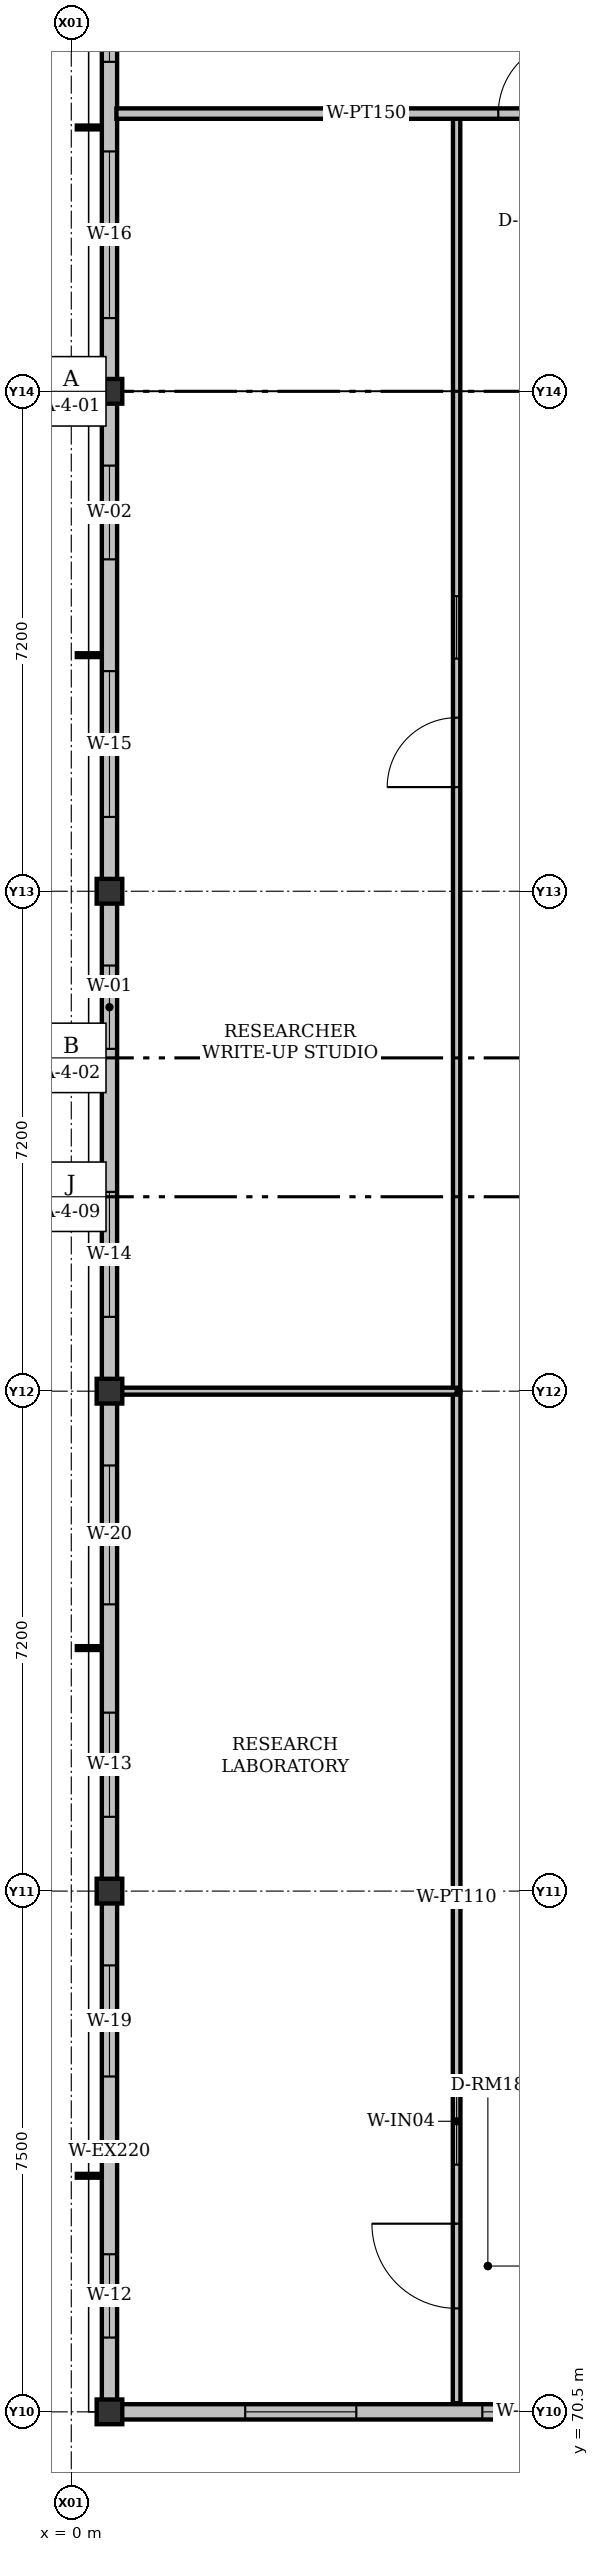
"""IFC4 building model, lengths in metres.
Left out: names, types, materials, properties, quantities, classifications, styles, units other than length and angle.
Written with IfcOpenShell. Run it as: python <this file> out.ifc"""

import sys

from ifc_helpers import new_model, si_unit, direction, frame, frame_2d, origin, origin_2d, place, context, subcontext, project, spatial, rectangle, i_section, extrude, element, fill, save


model = new_model("IFC4")
c1 = context("Model", 3, precision=1e-05, world=origin(), true_north=direction((0.0, 1.0)))
c2 = subcontext(c1, "Body", "Model", "MODEL_VIEW")
j1 = project(units=[si_unit("LENGTHUNIT", "METRE"), si_unit("PLANEANGLEUNIT", "RADIAN")], contexts=[c1])
p1 = place(None, origin())
s1 = spatial("IfcSite", under=j1, at=p1, CompositionType="ELEMENT")
p2 = place(p1, origin())
s2 = spatial("IfcBuilding", under=s1, at=p2, CompositionType="ELEMENT")
p3 = place(p2, frame((0.0, 0.0, 47.7)))
s3 = spatial("IfcBuildingStorey", under=s2, at=p3, CompositionType="ELEMENT", Elevation=47.7)
for number, where, z_axis, x_axis in (
    (1, (0.55, 70.5, 0.0), (0.0, 0.0, 1.0), (1.0, 0.0, 0.0)),
    (2, (0.55, 78.0, 0.0), (0.0, 0.0, 1.0), (1.0, 0.0, 0.0)),
    (3, (0.55, 85.2, 0.0), (0.0, 0.0, 1.0), (1.0, 0.0, 0.0)),
    (4, (0.55, 92.4, 0.0), (0.0, 0.0, 1.0), (1.0, 0.0, 0.0)),
    (5, (0.55, 99.6, 0.0), (0.0, 0.0, 1.0), (1.0, 0.0, 0.0)),
):
    element("IfcColumn", number, at=place(p3, frame(where, z_axis=z_axis, x_axis=x_axis)), inside=s3, PredefinedType="COLUMN", context=c2, shape_type="SweptSolid", body=[
        extrude(i_section(OverallWidth=0.369, OverallDepth=0.356, WebThickness=0.011, FlangeThickness=0.018, FilletRadius=0.015, at=origin_2d()), origin(), (0.0, 0.0, 1.0), 4.2),
    ])
p4 = place(p3, frame((0.55, 70.5, 0.0), z_axis=(0.0, 0.0, 1.0), x_axis=(0.0, 1.0, 0.0)))
e6 = element("IfcWall", 6, at=p4, inside=s3, PredefinedType="SOLIDWALL", context=c2, shape_type="SweptSolid", body=[
    extrude(rectangle(XDim=7.5, YDim=0.22, at=frame_2d((3.75, 0.0))), origin(), (0.0, 0.0, 1.0), 3.577),
])
p5 = place(p4, frame((1.07, 0.0, 0.92)))
e7 = element("IfcOpeningElement", 7, at=p5, cuts=e6, PredefinedType="OPENING", context=c2, shape_type="SweptSolid", body=[
    extrude(rectangle(XDim=1.2, YDim=1.7, at=frame_2d((0.6, 0.85))), frame((0.0, 0.11, 0.0), z_axis=(0.0, -1.0, 0.0), x_axis=(1.0, 0.0, 0.0)), (0.0, 0.0, 1.0), 0.22),
])
p6 = place(p4, frame((4.83, 0.0, 0.92)))
e8 = element("IfcOpeningElement", 8, at=p6, cuts=e6, PredefinedType="OPENING", context=c2, shape_type="SweptSolid", body=[
    extrude(rectangle(XDim=1.6, YDim=1.35, at=frame_2d((0.8, 0.675))), frame((0.0, 0.11, 0.0), z_axis=(0.0, -1.0, 0.0), x_axis=(1.0, 0.0, 0.0)), (0.0, 0.0, 1.0), 0.22),
])
p7 = place(p3, frame((0.55, 78.0, 0.0), z_axis=(0.0, 0.0, 1.0), x_axis=(0.0, 1.0, 0.0)))
e9 = element("IfcWall", 9, at=p7, inside=s3, PredefinedType="SOLIDWALL", context=c2, shape_type="SweptSolid", body=[
    extrude(rectangle(XDim=7.2, YDim=0.22, at=frame_2d((3.6, 0.0))), origin(), (0.0, 0.0, 1.0), 3.577),
])
p8 = place(p7, frame((1.07, 0.0, 0.92)))
e10 = element("IfcOpeningElement", 10, at=p8, cuts=e9, PredefinedType="OPENING", context=c2, shape_type="SweptSolid", body=[
    extrude(rectangle(XDim=1.5, YDim=1.7, at=frame_2d((0.75, 0.85))), frame((0.0, 0.11, 0.0), z_axis=(0.0, -1.0, 0.0), x_axis=(1.0, 0.0, 0.0)), (0.0, 0.0, 1.0), 0.22),
])
p9 = place(p7, frame((4.13, 0.0, 0.92)))
e11 = element("IfcOpeningElement", 11, at=p9, cuts=e9, PredefinedType="OPENING", context=c2, shape_type="SweptSolid", body=[
    extrude(rectangle(XDim=2.0, YDim=1.35, at=frame_2d((1.0, 0.675))), frame((0.0, 0.11, 0.0), z_axis=(0.0, -1.0, 0.0), x_axis=(1.0, 0.0, 0.0)), (0.0, 0.0, 1.0), 0.22),
])
p10 = place(p3, frame((0.55, 85.2, 0.0), z_axis=(0.0, 0.0, 1.0), x_axis=(0.0, 1.0, 0.0)))
e12 = element("IfcWall", 12, at=p10, inside=s3, PredefinedType="SOLIDWALL", context=c2, shape_type="SweptSolid", body=[
    extrude(rectangle(XDim=7.2, YDim=0.22, at=frame_2d((3.6, 0.0))), origin(), (0.0, 0.0, 1.0), 3.577),
])
p11 = place(p10, frame((1.07, 0.0, 0.92)))
e13 = element("IfcOpeningElement", 13, at=p11, cuts=e12, PredefinedType="OPENING", context=c2, shape_type="SweptSolid", body=[
    extrude(rectangle(XDim=1.8, YDim=1.7, at=frame_2d((0.9, 0.85))), frame((0.0, 0.11, 0.0), z_axis=(0.0, -1.0, 0.0), x_axis=(1.0, 0.0, 0.0)), (0.0, 0.0, 1.0), 0.22),
])
p12 = place(p10, frame((4.93, 0.0, 0.92)))
e14 = element("IfcOpeningElement", 14, at=p12, cuts=e12, PredefinedType="OPENING", context=c2, shape_type="SweptSolid", body=[
    extrude(rectangle(XDim=1.2, YDim=1.4, at=frame_2d((0.6, 0.7))), frame((0.0, 0.11, 0.0), z_axis=(0.0, -1.0, 0.0), x_axis=(1.0, 0.0, 0.0)), (0.0, 0.0, 1.0), 0.22),
])
p13 = place(p3, frame((0.55, 92.4, 0.0), z_axis=(0.0, 0.0, 1.0), x_axis=(0.0, 1.0, 0.0)))
e15 = element("IfcWall", 15, at=p13, inside=s3, PredefinedType="SOLIDWALL", context=c2, shape_type="SweptSolid", body=[
    extrude(rectangle(XDim=7.2, YDim=0.22, at=frame_2d((3.6, 0.0))), origin(), (0.0, 0.0, 1.0), 3.577),
])
p14 = place(p13, frame((1.07, 0.0, 0.92)))
e16 = element("IfcOpeningElement", 16, at=p14, cuts=e15, PredefinedType="OPENING", context=c2, shape_type="SweptSolid", body=[
    extrude(rectangle(XDim=2.1, YDim=1.7, at=frame_2d((1.05, 0.85))), frame((0.0, 0.11, 0.0), z_axis=(0.0, -1.0, 0.0), x_axis=(1.0, 0.0, 0.0)), (0.0, 0.0, 1.0), 0.22),
])
p15 = place(p13, frame((4.78, 0.0, 0.92)))
e17 = element("IfcOpeningElement", 17, at=p15, cuts=e15, PredefinedType="OPENING", context=c2, shape_type="SweptSolid", body=[
    extrude(rectangle(XDim=1.35, YDim=1.4, at=frame_2d((0.675, 0.7))), frame((0.0, 0.11, 0.0), z_axis=(0.0, -1.0, 0.0), x_axis=(1.0, 0.0, 0.0)), (0.0, 0.0, 1.0), 0.22),
])
p16 = place(p3, frame((0.55, 99.6, 0.0), z_axis=(0.0, 0.0, 1.0), x_axis=(0.0, 1.0, 0.0)))
e18 = element("IfcWall", 18, at=p16, inside=s3, PredefinedType="SOLIDWALL", context=c2, shape_type="SweptSolid", body=[
    extrude(rectangle(XDim=7.2, YDim=0.22, at=frame_2d((3.6, 0.0))), origin(), (0.0, 0.0, 1.0), 3.577),
])
p17 = place(p16, frame((1.055, 0.0, 0.92)))
e19 = element("IfcOpeningElement", 19, at=p17, cuts=e18, PredefinedType="OPENING", context=c2, shape_type="SweptSolid", body=[
    extrude(rectangle(XDim=2.4, YDim=1.7, at=frame_2d((1.2, 0.85))), frame((0.0, 0.11, 0.0), z_axis=(0.0, -1.0, 0.0), x_axis=(1.0, 0.0, 0.0)), (0.0, 0.0, 1.0), 0.22),
])
p18 = place(p16, frame((4.745, 0.0, 0.92)))
e20 = element("IfcOpeningElement", 20, at=p18, cuts=e18, PredefinedType="OPENING", context=c2, shape_type="SweptSolid", body=[
    extrude(rectangle(XDim=1.2, YDim=1.55, at=frame_2d((0.6, 0.775))), frame((0.0, 0.11, 0.0), z_axis=(0.0, -1.0, 0.0), x_axis=(1.0, 0.0, 0.0)), (0.0, 0.0, 1.0), 0.22),
])
p19 = place(p3, frame((7.85, 70.5, 0.0), z_axis=(0.0, 0.0, 1.0), x_axis=(-1.0, 0.0, 0.0)))
e21 = element("IfcWall", 21, at=p19, inside=s3, PredefinedType="SOLIDWALL", context=c2, shape_type="SweptSolid", body=[
    extrude(rectangle(XDim=7.3, YDim=0.22, at=frame_2d((3.65, 0.0))), origin(), (0.0, 0.0, 1.0), 3.577),
])
p20 = place(p19, frame((0.88, 0.0, 0.92)))
e22 = element("IfcOpeningElement", 22, at=p20, cuts=e21, PredefinedType="OPENING", context=c2, shape_type="SweptSolid", body=[
    extrude(rectangle(XDim=1.05, YDim=1.3, at=frame_2d((0.525, 0.65))), frame((0.0, 0.11, 0.0), z_axis=(0.0, -1.0, 0.0), x_axis=(1.0, 0.0, 0.0)), (0.0, 0.0, 1.0), 0.22),
])
p21 = place(p19, frame((3.745, 0.0, 0.92)))
e23 = element("IfcOpeningElement", 23, at=p21, cuts=e21, PredefinedType="OPENING", context=c2, shape_type="SweptSolid", body=[
    extrude(rectangle(XDim=1.6, YDim=1.35, at=frame_2d((0.8, 0.675))), frame((0.0, 0.11, 0.0), z_axis=(0.0, -1.0, 0.0), x_axis=(1.0, 0.0, 0.0)), (0.0, 0.0, 1.0), 0.22),
])
p22 = place(p3, frame((5.55, 70.625, 0.0), z_axis=(0.0, 0.0, 1.0), x_axis=(0.0, 1.0, 0.0)))
e24 = element("IfcWall", 24, at=p22, inside=s3, PredefinedType="PARTITIONING", context=c2, shape_type="SweptSolid", body=[
    extrude(rectangle(XDim=14.575, YDim=0.11, at=frame_2d((7.288, 0.0))), origin(), (0.0, 0.0, 1.0), 3.451),
])
p23 = place(p22, frame((1.365, 0.0, 0.0)))
e25 = element("IfcOpeningElement", 25, at=p23, cuts=e24, PredefinedType="OPENING", context=c2, shape_type="SweptSolid", body=[
    extrude(rectangle(XDim=1.22, YDim=2.2, at=frame_2d((0.61, 1.1))), frame((0.0, 0.055, 0.0), z_axis=(0.0, -1.0, 0.0), x_axis=(1.0, 0.0, 0.0)), (0.0, 0.0, 1.0), 0.11),
])
p24 = place(p22, frame((3.435, 0.0, 0.92)))
e26 = element("IfcOpeningElement", 26, at=p24, cuts=e24, PredefinedType="OPENING", context=c2, shape_type="SweptSolid", body=[
    extrude(rectangle(XDim=1.25, YDim=1.1, at=frame_2d((0.625, 0.55))), frame((0.0, 0.055, 0.0), z_axis=(0.0, -1.0, 0.0), x_axis=(1.0, 0.0, 0.0)), (0.0, 0.0, 1.0), 0.11),
])
p25 = place(p3, frame((5.55, 85.2, 0.0), z_axis=(0.0, 0.0, 1.0), x_axis=(0.0, 1.0, 0.0)))
e27 = element("IfcWall", 27, at=p25, inside=s3, PredefinedType="PARTITIONING", context=c2, shape_type="SweptSolid", body=[
    extrude(rectangle(XDim=18.4, YDim=0.105, at=frame_2d((9.2, 0.0))), origin(), (0.0, 0.0, 1.0), 3.451),
])
p26 = place(p25, frame((8.7, 0.0, 0.0)))
e28 = element("IfcOpeningElement", 28, at=p26, cuts=e27, PredefinedType="OPENING", context=c2, shape_type="SweptSolid", body=[
    extrude(rectangle(XDim=1.0, YDim=2.25, at=frame_2d((0.5, 1.125))), frame((0.0, 0.052, 0.0), z_axis=(0.0, -1.0, 0.0), x_axis=(1.0, 0.0, 0.0)), (0.0, 0.0, 1.0), 0.105),
])
p27 = place(p25, frame((10.55, 0.0, 0.92)))
e29 = element("IfcOpeningElement", 29, at=p27, cuts=e27, PredefinedType="OPENING", context=c2, shape_type="SweptSolid", body=[
    extrude(rectangle(XDim=0.9, YDim=1.2, at=frame_2d((0.45, 0.6))), frame((0.0, 0.052, 0.0), z_axis=(0.0, -1.0, 0.0), x_axis=(1.0, 0.0, 0.0)), (0.0, 0.0, 1.0), 0.105),
])
p28 = place(p3, frame((0.65, 85.2, 0.0), z_axis=(0.0, 0.0, 1.0), x_axis=(1.0, 0.0, 0.0)))
e30 = element("IfcWall", 30, at=p28, inside=s3, PredefinedType="PARTITIONING", context=c2, shape_type="SweptSolid", body=[
    extrude(rectangle(XDim=4.9, YDim=0.1, at=frame_2d((2.45, 0.0))), origin(), (0.0, 0.0, 1.0), 3.451),
])
p29 = place(p3, frame((0.65, 103.6, 0.0), z_axis=(0.0, 0.0, 1.0), x_axis=(1.0, 0.0, 0.0)))
e31 = element("IfcWall", 31, at=p29, inside=s3, PredefinedType="PARTITIONING", context=c2, shape_type="SweptSolid", body=[
    extrude(rectangle(XDim=7.2, YDim=0.15, at=frame_2d((3.6, 0.0))), origin(), (0.0, 0.0, 1.0), 3.527),
])
p30 = place(p29, frame((5.5, 0.0, 0.0)))
e32 = element("IfcOpeningElement", 32, at=p30, cuts=e31, PredefinedType="OPENING", context=c2, shape_type="SweptSolid", body=[
    extrude(rectangle(XDim=1.06, YDim=2.25, at=frame_2d((0.53, 1.125))), frame((0.0, 0.075, 0.0), z_axis=(0.0, -1.0, 0.0), x_axis=(1.0, 0.0, 0.0)), (0.0, 0.0, 1.0), 0.15),
])
p31 = place(p5, origin())
e33 = element("IfcWindow", 33, at=p31, inside=s3, PartitioningType="SINGLE_PANEL", PredefinedType="WINDOW", context=c2, shape_type="SweptSolid", body=[
    extrude(rectangle(XDim=1.2, YDim=1.7, at=frame_2d((0.6, 0.85))), frame((0.0, 0.03, 0.0), z_axis=(0.0, -1.0, 0.0), x_axis=(1.0, 0.0, 0.0)), (0.0, 0.0, 1.0), 0.06),
])
fill(e7, e33)
p32 = place(p6, origin())
e34 = element("IfcWindow", 34, at=p32, inside=s3, PartitioningType="DOUBLE_PANEL_VERTICAL", PredefinedType="WINDOW", context=c2, shape_type="SweptSolid", body=[
    extrude(rectangle(XDim=1.6, YDim=1.35, at=frame_2d((0.8, 0.675))), frame((0.0, 0.03, 0.0), z_axis=(0.0, -1.0, 0.0), x_axis=(1.0, 0.0, 0.0)), (0.0, 0.0, 1.0), 0.06),
])
fill(e8, e34)
p33 = place(p8, origin())
e35 = element("IfcWindow", 35, at=p33, inside=s3, PartitioningType="SINGLE_PANEL", PredefinedType="WINDOW", context=c2, shape_type="SweptSolid", body=[
    extrude(rectangle(XDim=1.5, YDim=1.7, at=frame_2d((0.75, 0.85))), frame((0.0, 0.03, 0.0), z_axis=(0.0, -1.0, 0.0), x_axis=(1.0, 0.0, 0.0)), (0.0, 0.0, 1.0), 0.06),
])
fill(e10, e35)
p34 = place(p9, origin())
e36 = element("IfcWindow", 36, at=p34, inside=s3, PartitioningType="DOUBLE_PANEL_VERTICAL", PredefinedType="WINDOW", context=c2, shape_type="SweptSolid", body=[
    extrude(rectangle(XDim=2.0, YDim=1.35, at=frame_2d((1.0, 0.675))), frame((0.0, 0.03, 0.0), z_axis=(0.0, -1.0, 0.0), x_axis=(1.0, 0.0, 0.0)), (0.0, 0.0, 1.0), 0.06),
])
fill(e11, e36)
p35 = place(p11, origin())
e37 = element("IfcWindow", 37, at=p35, inside=s3, PartitioningType="DOUBLE_PANEL_VERTICAL", PredefinedType="WINDOW", context=c2, shape_type="SweptSolid", body=[
    extrude(rectangle(XDim=1.8, YDim=1.7, at=frame_2d((0.9, 0.85))), frame((0.0, 0.03, 0.0), z_axis=(0.0, -1.0, 0.0), x_axis=(1.0, 0.0, 0.0)), (0.0, 0.0, 1.0), 0.06),
])
fill(e13, e37)
p36 = place(p12, origin())
e38 = element("IfcWindow", 38, at=p36, inside=s3, PartitioningType="SINGLE_PANEL", PredefinedType="WINDOW", context=c2, shape_type="SweptSolid", body=[
    extrude(rectangle(XDim=1.2, YDim=1.4, at=frame_2d((0.6, 0.7))), frame((0.0, 0.03, 0.0), z_axis=(0.0, -1.0, 0.0), x_axis=(1.0, 0.0, 0.0)), (0.0, 0.0, 1.0), 0.06),
])
fill(e14, e38)
p37 = place(p14, origin())
e39 = element("IfcWindow", 39, at=p37, inside=s3, PartitioningType="DOUBLE_PANEL_VERTICAL", PredefinedType="WINDOW", context=c2, shape_type="SweptSolid", body=[
    extrude(rectangle(XDim=2.1, YDim=1.7, at=frame_2d((1.05, 0.85))), frame((0.0, 0.03, 0.0), z_axis=(0.0, -1.0, 0.0), x_axis=(1.0, 0.0, 0.0)), (0.0, 0.0, 1.0), 0.06),
])
fill(e16, e39)
p38 = place(p15, origin())
e40 = element("IfcWindow", 40, at=p38, inside=s3, PartitioningType="SINGLE_PANEL", PredefinedType="WINDOW", context=c2, shape_type="SweptSolid", body=[
    extrude(rectangle(XDim=1.35, YDim=1.4, at=frame_2d((0.675, 0.7))), frame((0.0, 0.03, 0.0), z_axis=(0.0, -1.0, 0.0), x_axis=(1.0, 0.0, 0.0)), (0.0, 0.0, 1.0), 0.06),
])
fill(e17, e40)
p39 = place(p17, origin())
e41 = element("IfcWindow", 41, at=p39, inside=s3, PartitioningType="DOUBLE_PANEL_VERTICAL", PredefinedType="WINDOW", context=c2, shape_type="SweptSolid", body=[
    extrude(rectangle(XDim=2.4, YDim=1.7, at=frame_2d((1.2, 0.85))), frame((0.0, 0.03, 0.0), z_axis=(0.0, -1.0, 0.0), x_axis=(1.0, 0.0, 0.0)), (0.0, 0.0, 1.0), 0.06),
])
fill(e19, e41)
p40 = place(p18, origin())
e42 = element("IfcWindow", 42, at=p40, inside=s3, PartitioningType="SINGLE_PANEL", PredefinedType="WINDOW", context=c2, shape_type="SweptSolid", body=[
    extrude(rectangle(XDim=1.2, YDim=1.55, at=frame_2d((0.6, 0.775))), frame((0.0, 0.03, 0.0), z_axis=(0.0, -1.0, 0.0), x_axis=(1.0, 0.0, 0.0)), (0.0, 0.0, 1.0), 0.06),
])
fill(e20, e42)
p41 = place(p20, origin())
e43 = element("IfcWindow", 43, at=p41, inside=s3, PartitioningType="SINGLE_PANEL", PredefinedType="WINDOW", context=c2, shape_type="SweptSolid", body=[
    extrude(rectangle(XDim=1.05, YDim=1.3, at=frame_2d((0.525, 0.65))), frame((0.0, 0.03, 0.0), z_axis=(0.0, -1.0, 0.0), x_axis=(1.0, 0.0, 0.0)), (0.0, 0.0, 1.0), 0.06),
])
fill(e22, e43)
p42 = place(p21, origin())
e44 = element("IfcWindow", 44, at=p42, inside=s3, PartitioningType="DOUBLE_PANEL_VERTICAL", PredefinedType="WINDOW", context=c2, shape_type="SweptSolid", body=[
    extrude(rectangle(XDim=1.6, YDim=1.35, at=frame_2d((0.8, 0.675))), frame((0.0, 0.03, 0.0), z_axis=(0.0, -1.0, 0.0), x_axis=(1.0, 0.0, 0.0)), (0.0, 0.0, 1.0), 0.06),
])
fill(e23, e44)
p43 = place(p23, origin())
e45 = element("IfcDoor", 45, at=p43, inside=s3, OperationType="SINGLE_SWING_RIGHT", PredefinedType="DOOR", context=c2, shape_type="SweptSolid", body=[
    extrude(rectangle(XDim=1.22, YDim=2.2, at=frame_2d((0.61, 1.1))), frame((0.0, 0.025, 0.0), z_axis=(0.0, -1.0, 0.0), x_axis=(1.0, 0.0, 0.0)), (0.0, 0.0, 1.0), 0.05),
])
fill(e25, e45)
p44 = place(p24, origin())
e46 = element("IfcWindow", 46, at=p44, inside=s3, PartitioningType="SINGLE_PANEL", PredefinedType="WINDOW", context=c2, shape_type="SweptSolid", body=[
    extrude(rectangle(XDim=1.25, YDim=1.1, at=frame_2d((0.625, 0.55))), frame((0.0, 0.03, 0.0), z_axis=(0.0, -1.0, 0.0), x_axis=(1.0, 0.0, 0.0)), (0.0, 0.0, 1.0), 0.06),
])
fill(e26, e46)
p45 = place(p26, origin())
e47 = element("IfcDoor", 47, at=p45, inside=s3, OperationType="SINGLE_SWING_LEFT", PredefinedType="DOOR", context=c2, shape_type="SweptSolid", body=[
    extrude(rectangle(XDim=1.0, YDim=2.25, at=frame_2d((0.5, 1.125))), frame((0.0, 0.025, 0.0), z_axis=(0.0, -1.0, 0.0), x_axis=(1.0, 0.0, 0.0)), (0.0, 0.0, 1.0), 0.05),
])
fill(e28, e47)
p46 = place(p27, origin())
e48 = element("IfcWindow", 48, at=p46, inside=s3, PartitioningType="SINGLE_PANEL", PredefinedType="WINDOW", context=c2, shape_type="SweptSolid", body=[
    extrude(rectangle(XDim=0.9, YDim=1.2, at=frame_2d((0.45, 0.6))), frame((0.0, 0.03, 0.0), z_axis=(0.0, -1.0, 0.0), x_axis=(1.0, 0.0, 0.0)), (0.0, 0.0, 1.0), 0.06),
])
fill(e29, e48)
p47 = place(p30, origin())
e49 = element("IfcDoor", 49, at=p47, inside=s3, OperationType="SINGLE_SWING_RIGHT", PredefinedType="DOOR", context=c2, shape_type="SweptSolid", body=[
    extrude(rectangle(XDim=1.06, YDim=2.25, at=frame_2d((0.53, 1.125))), frame((0.0, 0.025, 0.0), z_axis=(0.0, -1.0, 0.0), x_axis=(1.0, 0.0, 0.0)), (0.0, 0.0, 1.0), 0.05),
])
fill(e32, e49)
save(model, sys.argv[1])
